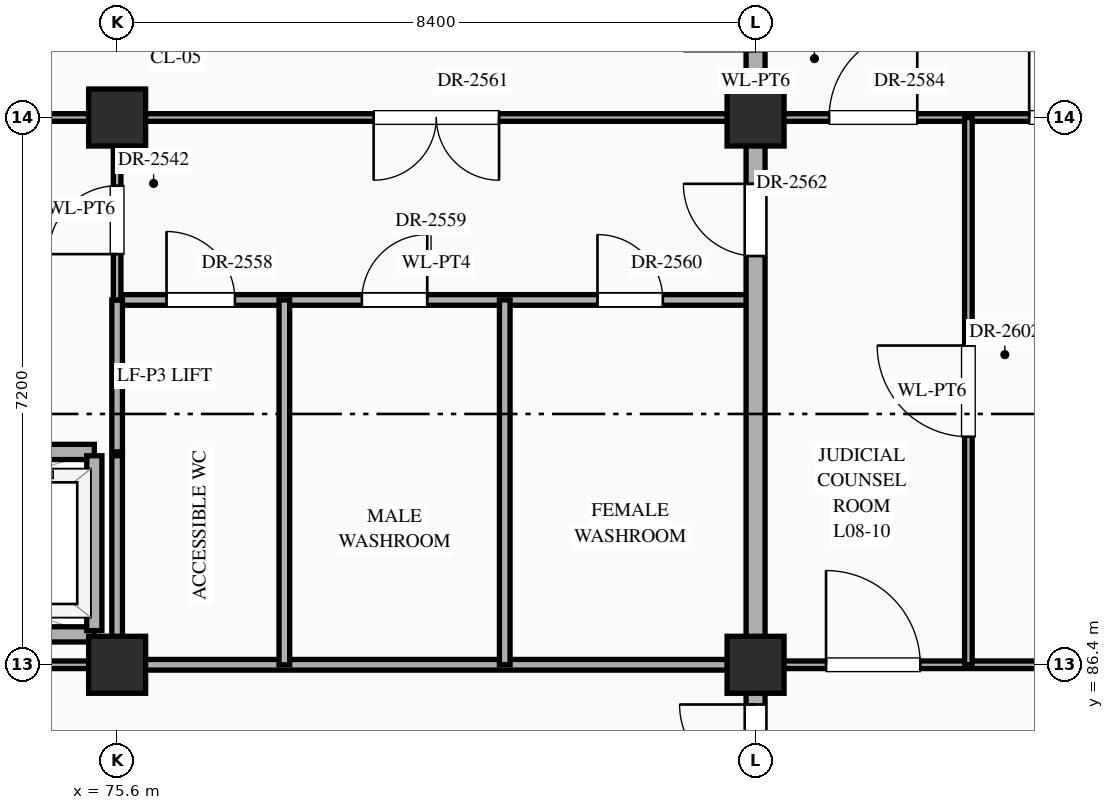
"""IFC4 building model, lengths in metres.
Left out: names, types, materials, properties, quantities, classifications, styles, units other than length and angle.
Written with IfcOpenShell. Run it as: python <this file> out.ifc"""

import sys

from ifc_helpers import new_model, si_unit, direction, frame, frame_2d, origin, origin_2d, place, context, subcontext, project, spatial, rectangle, extrude, element, fill, save


model = new_model("IFC4")
c1 = context("Model", 3, precision=1e-05, world=origin(), true_north=direction((0.0, 1.0)))
c2 = subcontext(c1, "Body", "Model", "MODEL_VIEW")
j1 = project(units=[si_unit("LENGTHUNIT", "METRE"), si_unit("PLANEANGLEUNIT", "RADIAN")], contexts=[c1])
p1 = place(None, origin())
s1 = spatial("IfcSite", under=j1, at=p1, CompositionType="ELEMENT")
p2 = place(p1, origin())
s2 = spatial("IfcBuilding", under=s1, at=p2, CompositionType="ELEMENT")
p3 = place(p2, frame((0.0, 0.0, 35.1)))
s3 = spatial("IfcBuildingStorey", under=s2, at=p3, CompositionType="ELEMENT", Elevation=35.1)
for number, where, z_axis, x_axis in (
    (1, (75.6, 86.4, 0.0), (0.0, 0.0, 1.0), (1.0, 0.0, 0.0)),
    (2, (75.6, 93.6, 0.0), (0.0, 0.0, 1.0), (1.0, 0.0, 0.0)),
    (3, (84.0, 86.4, 0.0), (0.0, 0.0, 1.0), (1.0, 0.0, 0.0)),
    (4, (84.0, 93.6, 0.0), (0.0, 0.0, 1.0), (1.0, 0.0, 0.0)),
):
    element("IfcColumn", number, at=place(p3, frame(where, z_axis=z_axis, x_axis=x_axis)), inside=s3, PredefinedType="COLUMN", context=c2, shape_type="SweptSolid", body=[
        extrude(rectangle(XDim=0.75, YDim=0.75, at=origin_2d()), origin(), (0.0, 0.0, 1.0), 4.2),
    ])
p4 = place(p3, frame((67.25, 86.4, 0.0), z_axis=(0.0, 0.0, 1.0), x_axis=(1.0, 0.0, 0.0)))
e5 = element("IfcWall", 5, at=p4, inside=s3, PredefinedType="STANDARD", context=c2, shape_type="SweptSolid", body=[
    extrude(rectangle(XDim=8.3, YDim=0.1, at=frame_2d((4.15, 0.0))), origin(), (0.0, 0.0, 1.0), 3.1),
])
p5 = place(p3, frame((75.6, 86.4, 0.0), z_axis=(0.0, 0.0, 1.0), x_axis=(1.0, 0.0, 0.0)))
e6 = element("IfcWall", 6, at=p5, inside=s3, PredefinedType="STANDARD", context=c2, shape_type="SweptSolid", body=[
    extrude(rectangle(XDim=8.4, YDim=0.14, at=frame_2d((4.2, 0.0))), origin(), (0.0, 0.0, 1.0), 3.1),
])
p6 = place(p3, frame((84.0, 86.4, 0.0), z_axis=(0.0, 0.0, 1.0), x_axis=(1.0, 0.0, 0.0)))
e7 = element("IfcWall", 7, at=p6, inside=s3, PredefinedType="STANDARD", context=c2, shape_type="SweptSolid", body=[
    extrude(rectangle(XDim=8.4, YDim=0.1, at=frame_2d((4.2, 0.0))), origin(), (0.0, 0.0, 1.0), 3.1),
])
p7 = place(p6, frame((0.927, 0.0, 0.0)))
e8 = element("IfcOpeningElement", 8, at=p7, cuts=e7, PredefinedType="OPENING", context=c2, shape_type="SweptSolid", body=[
    extrude(rectangle(XDim=1.24, YDim=2.3, at=frame_2d((0.62, 1.15))), frame((0.0, 0.062, 0.0), z_axis=(0.0, -1.0, 0.0), x_axis=(1.0, 0.0, 0.0)), (0.0, 0.0, 1.0), 0.124),
])
p8 = place(p6, frame((3.73, 0.0, 0.0)))
e9 = element("IfcOpeningElement", 9, at=p8, cuts=e7, PredefinedType="OPENING", context=c2, shape_type="SweptSolid", body=[
    extrude(rectangle(XDim=0.94, YDim=2.3, at=frame_2d((0.47, 1.15))), frame((0.0, 0.062, 0.0), z_axis=(0.0, -1.0, 0.0), x_axis=(1.0, 0.0, 0.0)), (0.0, 0.0, 1.0), 0.124),
])
p9 = place(p6, frame((6.363, 0.0, 0.0)))
e10 = element("IfcOpeningElement", 10, at=p9, cuts=e7, PredefinedType="OPENING", context=c2, shape_type="SweptSolid", body=[
    extrude(rectangle(XDim=0.98, YDim=2.35, at=frame_2d((0.49, 1.175))), frame((0.0, 0.062, 0.0), z_axis=(0.0, -1.0, 0.0), x_axis=(1.0, 0.0, 0.0)), (0.0, 0.0, 1.0), 0.124),
])
p10 = place(p3, frame((72.8, 86.8, 0.0), z_axis=(0.0, 0.0, 1.0), x_axis=(1.0, 0.0, 0.0)))
e11 = element("IfcWall", 11, at=p10, inside=s3, PredefinedType="STANDARD", context=c2, shape_type="SweptSolid", body=[
    extrude(rectangle(XDim=2.5, YDim=0.2, at=frame_2d((1.25, 0.0))), origin(), (0.0, 0.0, 1.0), 3.95),
])
p11 = place(p3, frame((67.6, 89.2, 0.0), z_axis=(0.0, 0.0, 1.0), x_axis=(1.0, 0.0, 0.0)))
e12 = element("IfcWall", 12, at=p11, inside=s3, PredefinedType="STANDARD", context=c2, shape_type="SweptSolid", body=[
    extrude(rectangle(XDim=7.7, YDim=0.2, at=frame_2d((3.85, 0.0))), origin(), (0.0, 0.0, 1.0), 3.95),
])
p12 = place(p11, frame((0.725, 0.0, 0.0)))
e13 = element("IfcOpeningElement", 13, at=p12, cuts=e12, PredefinedType="OPENING", context=c2, shape_type="SweptSolid", body=[
    extrude(rectangle(XDim=1.1, YDim=2.15, at=frame_2d((0.55, 1.075))), frame((0.0, 0.112, 0.0), z_axis=(0.0, -1.0, 0.0), x_axis=(1.0, 0.0, 0.0)), (0.0, 0.0, 1.0), 0.224),
])
p13 = place(p11, frame((3.3, 0.0, 0.0)))
e14 = element("IfcOpeningElement", 14, at=p13, cuts=e12, PredefinedType="OPENING", context=c2, shape_type="SweptSolid", body=[
    extrude(rectangle(XDim=1.1, YDim=2.15, at=frame_2d((0.55, 1.075))), frame((0.0, 0.112, 0.0), z_axis=(0.0, -1.0, 0.0), x_axis=(1.0, 0.0, 0.0)), (0.0, 0.0, 1.0), 0.224),
])
p14 = place(p11, frame((5.875, 0.0, 0.0)))
e15 = element("IfcOpeningElement", 15, at=p14, cuts=e12, PredefinedType="OPENING", context=c2, shape_type="SweptSolid", body=[
    extrude(rectangle(XDim=1.1, YDim=2.15, at=frame_2d((0.55, 1.075))), frame((0.0, 0.112, 0.0), z_axis=(0.0, -1.0, 0.0), x_axis=(1.0, 0.0, 0.0)), (0.0, 0.0, 1.0), 0.224),
])
p15 = place(p3, frame((75.6, 91.2, 0.0), z_axis=(0.0, 0.0, 1.0), x_axis=(1.0, 0.0, 0.0)))
e16 = element("IfcWall", 16, at=p15, inside=s3, PredefinedType="STANDARD", context=c2, shape_type="SweptSolid", body=[
    extrude(rectangle(XDim=8.4, YDim=0.14, at=frame_2d((4.2, 0.0))), origin(), (0.0, 0.0, 1.0), 3.95),
])
p16 = place(p15, frame((0.65, 0.0, 0.0)))
e17 = element("IfcOpeningElement", 17, at=p16, cuts=e16, PredefinedType="OPENING", context=c2, shape_type="SweptSolid", body=[
    extrude(rectangle(XDim=0.9, YDim=2.15, at=frame_2d((0.45, 1.075))), frame((0.0, 0.082, 0.0), z_axis=(0.0, -1.0, 0.0), x_axis=(1.0, 0.0, 0.0)), (0.0, 0.0, 1.0), 0.164),
])
p17 = place(p15, frame((3.22, 0.0, 0.0)))
e18 = element("IfcOpeningElement", 18, at=p17, cuts=e16, PredefinedType="OPENING", context=c2, shape_type="SweptSolid", body=[
    extrude(rectangle(XDim=0.86, YDim=2.1, at=frame_2d((0.43, 1.05))), frame((0.0, 0.082, 0.0), z_axis=(0.0, -1.0, 0.0), x_axis=(1.0, 0.0, 0.0)), (0.0, 0.0, 1.0), 0.164),
])
p18 = place(p15, frame((6.32, 0.0, 0.0)))
e19 = element("IfcOpeningElement", 19, at=p18, cuts=e16, PredefinedType="OPENING", context=c2, shape_type="SweptSolid", body=[
    extrude(rectangle(XDim=0.86, YDim=2.1, at=frame_2d((0.43, 1.05))), frame((0.0, 0.082, 0.0), z_axis=(0.0, -1.0, 0.0), x_axis=(1.0, 0.0, 0.0)), (0.0, 0.0, 1.0), 0.164),
])
p19 = place(p3, frame((67.2, 93.6, 0.0), z_axis=(0.0, 0.0, 1.0), x_axis=(1.0, 0.0, 0.0)))
e20 = element("IfcWall", 20, at=p19, inside=s3, PredefinedType="STANDARD", context=c2, shape_type="SweptSolid", body=[
    extrude(rectangle(XDim=33.6, YDim=0.1, at=frame_2d((16.8, 0.0))), origin(), (0.0, 0.0, 1.0), 3.1),
])
p20 = place(p19, frame((3.375, 0.0, 0.0)))
e21 = element("IfcOpeningElement", 21, at=p20, cuts=e20, PredefinedType="OPENING", context=c2, shape_type="SweptSolid", body=[
    extrude(rectangle(XDim=1.65, YDim=2.4, at=frame_2d((0.825, 1.2))), frame((0.0, 0.062, 0.0), z_axis=(0.0, -1.0, 0.0), x_axis=(1.0, 0.0, 0.0)), (0.0, 0.0, 1.0), 0.124),
])
p21 = place(p19, frame((28.625, 0.0, 0.0)))
e22 = element("IfcOpeningElement", 22, at=p21, cuts=e20, PredefinedType="OPENING", context=c2, shape_type="SweptSolid", body=[
    extrude(rectangle(XDim=1.55, YDim=2.35, at=frame_2d((0.775, 1.175))), frame((0.0, 0.062, 0.0), z_axis=(0.0, -1.0, 0.0), x_axis=(1.0, 0.0, 0.0)), (0.0, 0.0, 1.0), 0.124),
])
p22 = place(p19, frame((11.775, 0.0, 0.0)))
e23 = element("IfcOpeningElement", 23, at=p22, cuts=e20, PredefinedType="OPENING", context=c2, shape_type="SweptSolid", body=[
    extrude(rectangle(XDim=1.65, YDim=2.4, at=frame_2d((0.825, 1.2))), frame((0.0, 0.062, 0.0), z_axis=(0.0, -1.0, 0.0), x_axis=(1.0, 0.0, 0.0)), (0.0, 0.0, 1.0), 0.124),
])
p23 = place(p19, frame((17.768, 0.0, 0.0)))
e24 = element("IfcOpeningElement", 24, at=p23, cuts=e20, PredefinedType="OPENING", context=c2, shape_type="SweptSolid", body=[
    extrude(rectangle(XDim=1.16, YDim=2.3, at=frame_2d((0.58, 1.15))), frame((0.0, 0.062, 0.0), z_axis=(0.0, -1.0, 0.0), x_axis=(1.0, 0.0, 0.0)), (0.0, 0.0, 1.0), 0.124),
])
p24 = place(p19, frame((20.4, 0.0, 0.0)))
e25 = element("IfcOpeningElement", 25, at=p24, cuts=e20, PredefinedType="OPENING", context=c2, shape_type="SweptSolid", body=[
    extrude(rectangle(XDim=1.2, YDim=2.35, at=frame_2d((0.6, 1.175))), frame((0.0, 0.062, 0.0), z_axis=(0.0, -1.0, 0.0), x_axis=(1.0, 0.0, 0.0)), (0.0, 0.0, 1.0), 0.124),
])
p25 = place(p19, frame((23.032, 0.0, 0.0)))
e26 = element("IfcOpeningElement", 26, at=p25, cuts=e20, PredefinedType="OPENING", context=c2, shape_type="SweptSolid", body=[
    extrude(rectangle(XDim=1.24, YDim=2.3, at=frame_2d((0.62, 1.15))), frame((0.0, 0.062, 0.0), z_axis=(0.0, -1.0, 0.0), x_axis=(1.0, 0.0, 0.0)), (0.0, 0.0, 1.0), 0.124),
])
p26 = place(p3, frame((75.3, 86.85, 0.0), z_axis=(0.0, 0.0, 1.0), x_axis=(0.0, 1.0, 0.0)))
e27 = element("IfcWall", 27, at=p26, inside=s3, PredefinedType="STANDARD", context=c2, shape_type="SweptSolid", body=[
    extrude(rectangle(XDim=2.3, YDim=0.2, at=frame_2d((1.15, 0.0))), origin(), (0.0, 0.0, 1.0), 3.95),
])
p27 = place(p3, frame((75.6, 86.45, 0.0), z_axis=(0.0, 0.0, 1.0), x_axis=(0.0, 1.0, 0.0)))
e28 = element("IfcWall", 28, at=p27, inside=s3, PredefinedType="STANDARD", context=c2, shape_type="SweptSolid", body=[
    extrude(rectangle(XDim=2.7, YDim=0.14, at=frame_2d((1.35, 0.0))), origin(), (0.0, 0.0, 1.0), 3.2),
])
p28 = place(p3, frame((75.6, 89.2, 0.0), z_axis=(0.0, 0.0, 1.0), x_axis=(0.0, 1.0, 0.0)))
e29 = element("IfcWall", 29, at=p28, inside=s3, PredefinedType="STANDARD", context=c2, shape_type="SweptSolid", body=[
    extrude(rectangle(XDim=2.0, YDim=0.14, at=frame_2d((1.0, 0.0))), origin(), (0.0, 0.0, 1.0), 3.2),
])
p29 = place(p3, frame((75.6, 91.2, 0.0), z_axis=(0.0, 0.0, 1.0), x_axis=(0.0, 1.0, 0.0)))
e30 = element("IfcWall", 30, at=p29, inside=s3, PredefinedType="STANDARD", context=c2, shape_type="SweptSolid", body=[
    extrude(rectangle(XDim=2.4, YDim=0.1, at=frame_2d((1.2, 0.0))), origin(), (0.0, 0.0, 1.0), 3.2),
])
p30 = place(p29, frame((0.603, 0.0, 0.0)))
e31 = element("IfcOpeningElement", 31, at=p30, cuts=e30, PredefinedType="OPENING", context=c2, shape_type="SweptSolid", body=[
    extrude(rectangle(XDim=0.9, YDim=2.15, at=frame_2d((0.45, 1.075))), frame((0.0, 0.062, 0.0), z_axis=(0.0, -1.0, 0.0), x_axis=(1.0, 0.0, 0.0)), (0.0, 0.0, 1.0), 0.124),
])
for number, where, z_axis, x_axis in (
    (32, (77.8, 86.4, 0.0), (0.0, 0.0, 1.0), (0.0, 1.0, 0.0)),
    (33, (80.7, 86.4, 0.0), (0.0, 0.0, 1.0), (0.0, 1.0, 0.0)),
):
    element("IfcWall", number, at=place(p3, frame(where, z_axis=z_axis, x_axis=x_axis)), inside=s3, PredefinedType="STANDARD", context=c2, shape_type="SweptSolid", body=[
        extrude(rectangle(XDim=4.8, YDim=0.14, at=frame_2d((2.4, 0.0))), origin(), (0.0, 0.0, 1.0), 3.95),
    ])
p31 = place(p3, frame((84.0, 84.65, 0.0), z_axis=(0.0, 0.0, 1.0), x_axis=(0.0, 1.0, 0.0)))
e34 = element("IfcWall", 34, at=p31, inside=s3, PredefinedType="STANDARD", context=c2, shape_type="SweptSolid", body=[
    extrude(rectangle(XDim=30.51, YDim=0.25, at=frame_2d((15.255, 0.0))), origin(), (0.0, 0.0, 1.0), 3.2),
])
p32 = place(p31, frame((17.097, 0.0, 0.0)))
e35 = element("IfcOpeningElement", 35, at=p32, cuts=e34, PredefinedType="OPENING", context=c2, shape_type="SweptSolid", body=[
    extrude(rectangle(XDim=2.0, YDim=2.4, at=frame_2d((1.0, 1.2))), frame((0.0, 0.137, 0.0), z_axis=(0.0, -1.0, 0.0), x_axis=(1.0, 0.0, 0.0)), (0.0, 0.0, 1.0), 0.274),
])
p33 = place(p31, frame((7.127, 0.0, 0.0)))
e36 = element("IfcOpeningElement", 36, at=p33, cuts=e34, PredefinedType="OPENING", context=c2, shape_type="SweptSolid", body=[
    extrude(rectangle(XDim=0.95, YDim=2.15, at=frame_2d((0.475, 1.075))), frame((0.0, 0.137, 0.0), z_axis=(0.0, -1.0, 0.0), x_axis=(1.0, 0.0, 0.0)), (0.0, 0.0, 1.0), 0.274),
])
p34 = place(p31, frame((9.823, 0.0, 0.0)))
e37 = element("IfcOpeningElement", 37, at=p34, cuts=e34, PredefinedType="OPENING", context=c2, shape_type="SweptSolid", body=[
    extrude(rectangle(XDim=0.95, YDim=2.15, at=frame_2d((0.475, 1.075))), frame((0.0, 0.137, 0.0), z_axis=(0.0, -1.0, 0.0), x_axis=(1.0, 0.0, 0.0)), (0.0, 0.0, 1.0), 0.274),
])
p35 = place(p31, frame((20.603, 0.0, 0.0)))
e38 = element("IfcOpeningElement", 38, at=p35, cuts=e34, PredefinedType="OPENING", context=c2, shape_type="SweptSolid", body=[
    extrude(rectangle(XDim=1.6, YDim=2.3, at=frame_2d((0.8, 1.15))), frame((0.0, 0.137, 0.0), z_axis=(0.0, -1.0, 0.0), x_axis=(1.0, 0.0, 0.0)), (0.0, 0.0, 1.0), 0.274),
])
p36 = place(p31, frame((23.873, 0.0, 0.0)))
e39 = element("IfcOpeningElement", 39, at=p36, cuts=e34, PredefinedType="OPENING", context=c2, shape_type="SweptSolid", body=[
    extrude(rectangle(XDim=1.0, YDim=2.2, at=frame_2d((0.5, 1.1))), frame((0.0, 0.137, 0.0), z_axis=(0.0, -1.0, 0.0), x_axis=(1.0, 0.0, 0.0)), (0.0, 0.0, 1.0), 0.274),
])
p37 = place(p31, frame((0.228, 0.0, 0.0)))
e40 = element("IfcOpeningElement", 40, at=p37, cuts=e34, PredefinedType="OPENING", context=c2, shape_type="SweptSolid", body=[
    extrude(rectangle(XDim=1.0, YDim=2.2, at=frame_2d((0.5, 1.1))), frame((0.0, 0.137, 0.0), z_axis=(0.0, -1.0, 0.0), x_axis=(1.0, 0.0, 0.0)), (0.0, 0.0, 1.0), 0.274),
])
p38 = place(p3, frame((86.8, 86.4, 0.0), z_axis=(0.0, 0.0, 1.0), x_axis=(0.0, 1.0, 0.0)))
e41 = element("IfcWall", 41, at=p38, inside=s3, PredefinedType="STANDARD", context=c2, shape_type="SweptSolid", body=[
    extrude(rectangle(XDim=7.2, YDim=0.1, at=frame_2d((3.6, 0.0))), origin(), (0.0, 0.0, 1.0), 3.95),
])
p39 = place(p38, frame((3.0, 0.0, 0.0)))
e42 = element("IfcOpeningElement", 42, at=p39, cuts=e41, PredefinedType="OPENING", context=c2, shape_type="SweptSolid", body=[
    extrude(rectangle(XDim=1.2, YDim=2.35, at=frame_2d((0.6, 1.175))), frame((0.0, 0.062, 0.0), z_axis=(0.0, -1.0, 0.0), x_axis=(1.0, 0.0, 0.0)), (0.0, 0.0, 1.0), 0.124),
])
p40 = place(p30, origin())
e43 = element("IfcDoor", 43, at=p40, inside=s3, OperationType="SINGLE_SWING_LEFT", PredefinedType="DOOR", context=c2, shape_type="SweptSolid", body=[
    extrude(rectangle(XDim=0.9, YDim=2.15, at=frame_2d((0.45, 1.075))), frame((0.0, 0.025, 0.0), z_axis=(0.0, -1.0, 0.0), x_axis=(1.0, 0.0, 0.0)), (0.0, 0.0, 1.0), 0.05),
])
fill(e31, e43)
p41 = place(p16, origin())
e44 = element("IfcDoor", 44, at=p41, inside=s3, OperationType="SINGLE_SWING_LEFT", PredefinedType="DOOR", context=c2, shape_type="SweptSolid", body=[
    extrude(rectangle(XDim=0.9, YDim=2.15, at=frame_2d((0.45, 1.075))), frame((0.0, 0.025, 0.0), z_axis=(0.0, -1.0, 0.0), x_axis=(1.0, 0.0, 0.0)), (0.0, 0.0, 1.0), 0.05),
])
fill(e17, e44)
p42 = place(p17, origin())
e45 = element("IfcDoor", 45, at=p42, inside=s3, OperationType="SINGLE_SWING_RIGHT", PredefinedType="DOOR", context=c2, shape_type="SweptSolid", body=[
    extrude(rectangle(XDim=0.86, YDim=2.1, at=frame_2d((0.43, 1.05))), frame((0.0, 0.025, 0.0), z_axis=(0.0, -1.0, 0.0), x_axis=(1.0, 0.0, 0.0)), (0.0, 0.0, 1.0), 0.05),
])
fill(e18, e45)
p43 = place(p18, origin())
e46 = element("IfcDoor", 46, at=p43, inside=s3, OperationType="SINGLE_SWING_LEFT", PredefinedType="DOOR", context=c2, shape_type="SweptSolid", body=[
    extrude(rectangle(XDim=0.86, YDim=2.1, at=frame_2d((0.43, 1.05))), frame((0.0, 0.025, 0.0), z_axis=(0.0, -1.0, 0.0), x_axis=(1.0, 0.0, 0.0)), (0.0, 0.0, 1.0), 0.05),
])
fill(e19, e46)
p44 = place(p22, frame((1.65, 0.0, 0.0), z_axis=(0.0, 0.0, 1.0), x_axis=(-1.0, 0.0, 0.0)))
e47 = element("IfcDoor", 47, at=p44, inside=s3, OperationType="DOUBLE_DOOR_SINGLE_SWING", PredefinedType="DOOR", context=c2, shape_type="SweptSolid", body=[
    extrude(rectangle(XDim=1.65, YDim=2.4, at=frame_2d((0.825, 1.2))), frame((0.0, 0.025, 0.0), z_axis=(0.0, -1.0, 0.0), x_axis=(1.0, 0.0, 0.0)), (0.0, 0.0, 1.0), 0.05),
])
fill(e23, e47)
p45 = place(p33, origin())
e48 = element("IfcDoor", 48, at=p45, inside=s3, OperationType="SINGLE_SWING_RIGHT", PredefinedType="DOOR", context=c2, shape_type="SweptSolid", body=[
    extrude(rectangle(XDim=0.95, YDim=2.15, at=frame_2d((0.475, 1.075))), frame((0.0, 0.025, 0.0), z_axis=(0.0, -1.0, 0.0), x_axis=(1.0, 0.0, 0.0)), (0.0, 0.0, 1.0), 0.05),
])
fill(e36, e48)
p46 = place(p23, origin())
e49 = element("IfcDoor", 49, at=p46, inside=s3, OperationType="SINGLE_SWING_RIGHT", PredefinedType="DOOR", context=c2, shape_type="SweptSolid", body=[
    extrude(rectangle(XDim=1.16, YDim=2.3, at=frame_2d((0.58, 1.15))), frame((0.0, 0.025, 0.0), z_axis=(0.0, -1.0, 0.0), x_axis=(1.0, 0.0, 0.0)), (0.0, 0.0, 1.0), 0.05),
])
fill(e24, e49)
p47 = place(p24, origin())
e50 = element("IfcDoor", 50, at=p47, inside=s3, OperationType="SINGLE_SWING_LEFT", PredefinedType="DOOR", context=c2, shape_type="SweptSolid", body=[
    extrude(rectangle(XDim=1.2, YDim=2.35, at=frame_2d((0.6, 1.175))), frame((0.0, 0.025, 0.0), z_axis=(0.0, -1.0, 0.0), x_axis=(1.0, 0.0, 0.0)), (0.0, 0.0, 1.0), 0.05),
])
fill(e25, e50)
p48 = place(p39, origin())
e51 = element("IfcDoor", 51, at=p48, inside=s3, OperationType="SINGLE_SWING_RIGHT", PredefinedType="DOOR", context=c2, shape_type="SweptSolid", body=[
    extrude(rectangle(XDim=1.2, YDim=2.35, at=frame_2d((0.6, 1.175))), frame((0.0, 0.025, 0.0), z_axis=(0.0, -1.0, 0.0), x_axis=(1.0, 0.0, 0.0)), (0.0, 0.0, 1.0), 0.05),
])
fill(e42, e51)
p49 = place(p7, origin())
e52 = element("IfcDoor", 52, at=p49, inside=s3, OperationType="SINGLE_SWING_LEFT", PredefinedType="DOOR", context=c2, shape_type="SweptSolid", body=[
    extrude(rectangle(XDim=1.24, YDim=2.3, at=frame_2d((0.62, 1.15))), frame((0.0, 0.025, 0.0), z_axis=(0.0, -1.0, 0.0), x_axis=(1.0, 0.0, 0.0)), (0.0, 0.0, 1.0), 0.05),
])
fill(e8, e52)
p50 = place(p37, origin())
e53 = element("IfcDoor", 53, at=p50, inside=s3, OperationType="SINGLE_SWING_RIGHT", PredefinedType="DOOR", context=c2, shape_type="SweptSolid", body=[
    extrude(rectangle(XDim=1.0, YDim=2.2, at=frame_2d((0.5, 1.1))), frame((0.0, 0.025, 0.0), z_axis=(0.0, -1.0, 0.0), x_axis=(1.0, 0.0, 0.0)), (0.0, 0.0, 1.0), 0.05),
])
fill(e40, e53)
save(model, sys.argv[1])
